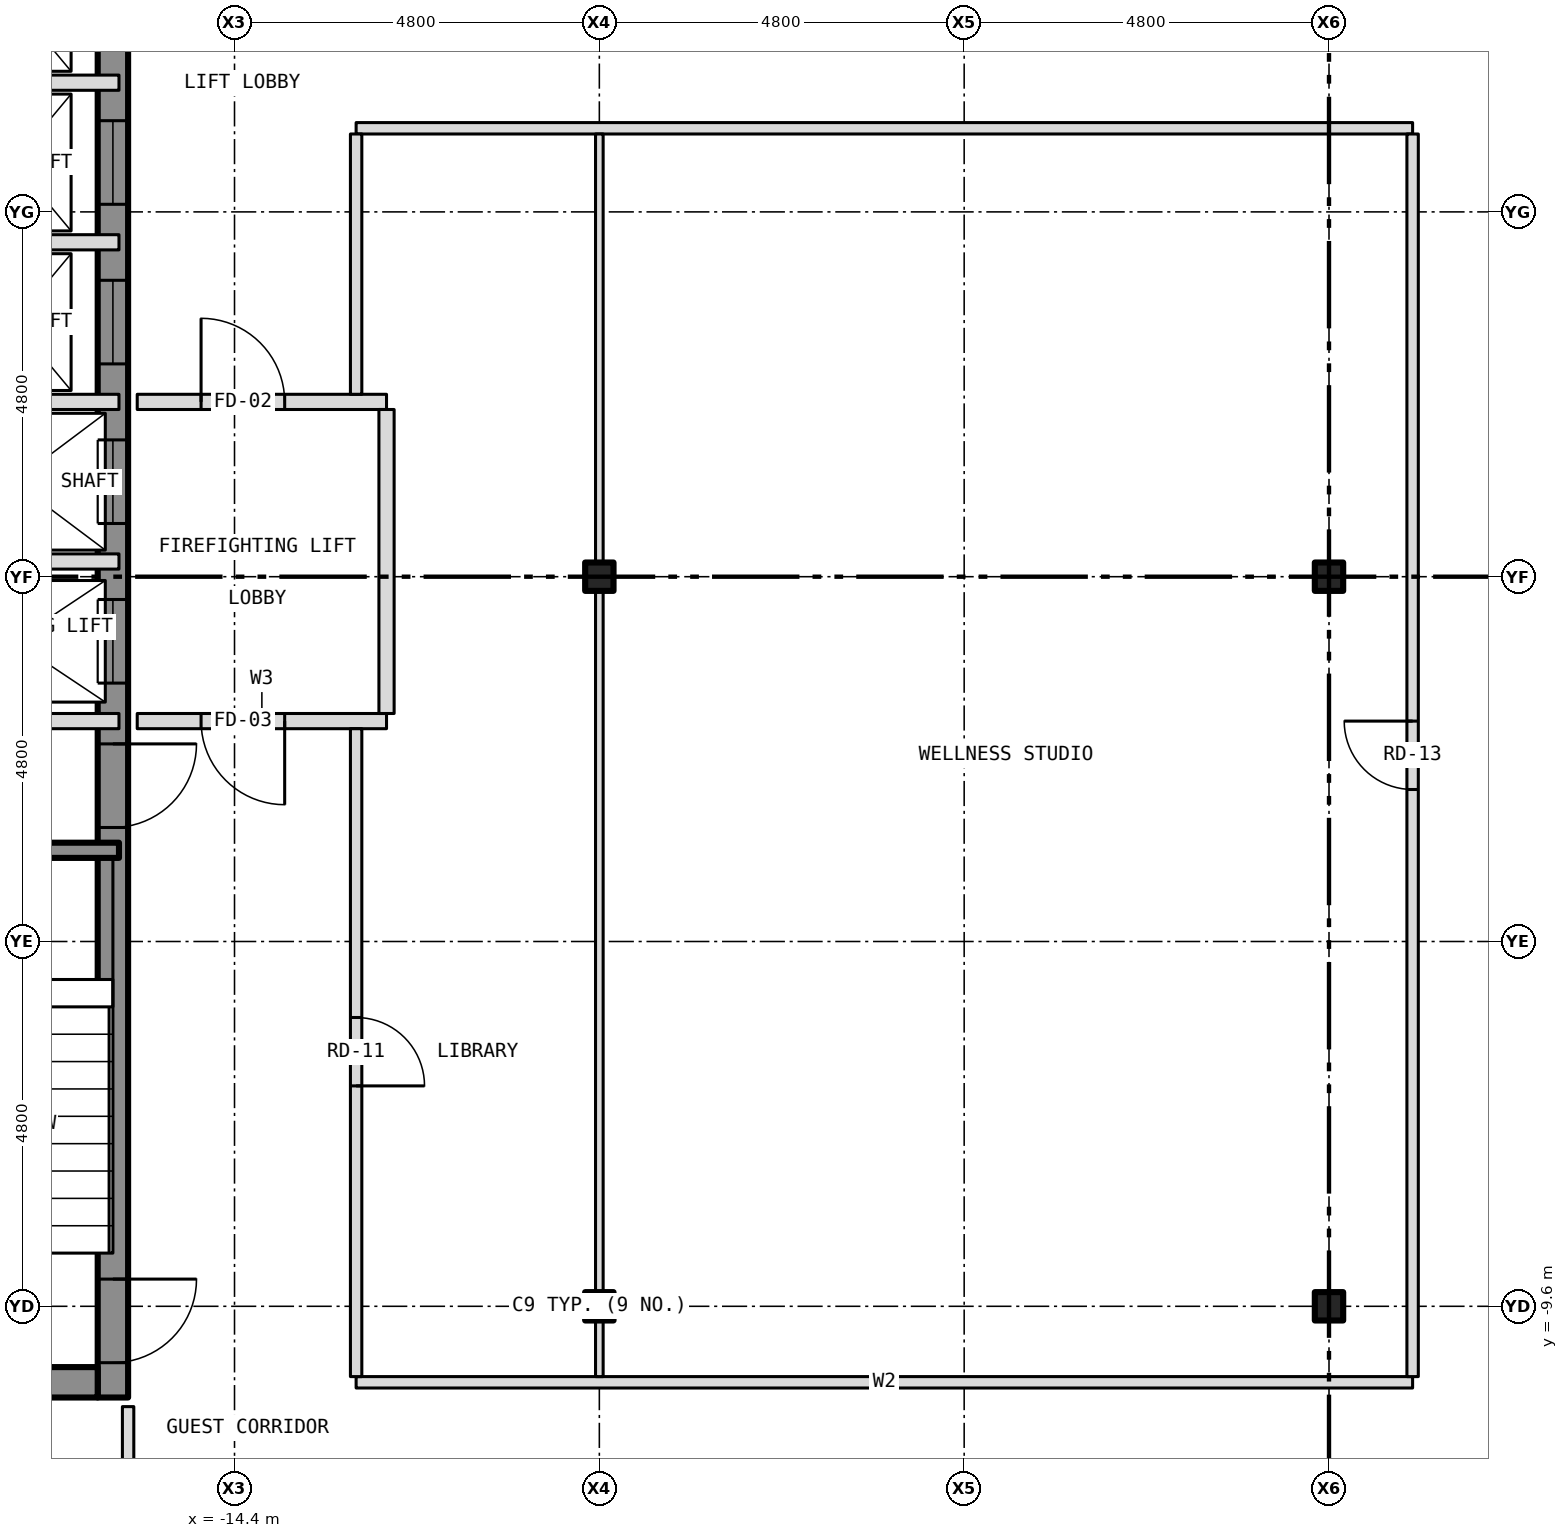
"""IFC4 building model, lengths in metres.
Left out: names, types, materials, properties, quantities, classifications, styles, units other than length and angle.
Written with IfcOpenShell. Run it as: python <this file> out.ifc"""

import sys

from ifc_helpers import new_model, si_unit, direction, frame, frame_2d, origin, origin_2d, place, context, subcontext, project, spatial, rectangle, i_section, extrude, element, fill, save


model = new_model("IFC4")
c1 = context("Model", 3, precision=1e-05, world=origin(), true_north=direction((0.0, 1.0)))
c2 = subcontext(c1, "Body", "Model", "MODEL_VIEW")
j1 = project(units=[si_unit("LENGTHUNIT", "METRE"), si_unit("PLANEANGLEUNIT", "RADIAN")], contexts=[c1])
p1 = place(None, origin())
s1 = spatial("IfcSite", under=j1, at=p1, CompositionType="ELEMENT")
p2 = place(p1, origin())
s2 = spatial("IfcBuilding", under=s1, at=p2, CompositionType="ELEMENT")
p3 = place(p2, frame((0.0, 0.0, 208.5)))
s3 = spatial("IfcBuildingStorey", under=s2, at=p3, CompositionType="ELEMENT", Elevation=208.5)
for number, where, z_axis, x_axis in (
    (1, (-9.6, -9.6, -0.15), (0.0, 0.0, 1.0), (1.0, 0.0, 0.0)),
    (2, (-9.6, 0.0, -0.15), (0.0, 0.0, 1.0), (1.0, 0.0, 0.0)),
    (3, (0.0, -9.6, -0.15), (0.0, 0.0, 1.0), (1.0, 0.0, 0.0)),
    (4, (0.0, 0.0, -0.15), (0.0, 0.0, 1.0), (1.0, 0.0, 0.0)),
):
    element("IfcColumn", number, at=place(p3, frame(where, z_axis=z_axis, x_axis=x_axis)), inside=s3, PredefinedType="COLUMN", context=c2, shape_type="SweptSolid", body=[
        extrude(i_section(OverallWidth=0.373, OverallDepth=0.373, WebThickness=0.016, FlangeThickness=0.026, at=origin_2d()), origin(), (0.0, 0.0, 1.0), 3.5),
    ])
p4 = place(p3, frame((-16.0, -10.8, 0.0), z_axis=(0.0, 0.0, 1.0), x_axis=(0.0, 1.0, 0.0)))
e5 = element("IfcWall", 5, at=p4, inside=s3, PredefinedType="SHEAR", context=c2, shape_type="SweptSolid", body=[
    extrude(rectangle(XDim=21.6, YDim=0.4, at=frame_2d((10.8, 0.0))), origin(), (0.0, 0.0, 1.0), 3.25),
])
p5 = place(p4, frame((9.4, 0.0, 0.0)))
e6 = element("IfcOpeningElement", 6, at=p5, cuts=e5, PredefinedType="OPENING", context=c2, shape_type="SweptSolid", body=[
    extrude(rectangle(XDim=1.1, YDim=2.1, at=frame_2d((0.55, 1.05))), frame((0.0, 0.212, 0.0), z_axis=(0.0, -1.0, 0.0), x_axis=(1.0, 0.0, 0.0)), (0.0, 0.0, 1.0), 0.424),
])
p6 = place(p4, frame((11.5, 0.0, 0.0)))
e7 = element("IfcOpeningElement", 7, at=p6, cuts=e5, PredefinedType="OPENING", context=c2, shape_type="SweptSolid", body=[
    extrude(rectangle(XDim=1.1, YDim=2.1, at=frame_2d((0.55, 1.05))), frame((0.0, 0.212, 0.0), z_axis=(0.0, -1.0, 0.0), x_axis=(1.0, 0.0, 0.0)), (0.0, 0.0, 1.0), 0.424),
])
p7 = place(p4, frame((13.6, 0.0, 0.0)))
e8 = element("IfcOpeningElement", 8, at=p7, cuts=e5, PredefinedType="OPENING", context=c2, shape_type="SweptSolid", body=[
    extrude(rectangle(XDim=1.1, YDim=2.1, at=frame_2d((0.55, 1.05))), frame((0.0, 0.212, 0.0), z_axis=(0.0, -1.0, 0.0), x_axis=(1.0, 0.0, 0.0)), (0.0, 0.0, 1.0), 0.424),
])
p8 = place(p4, frame((15.7, 0.0, 0.0)))
e9 = element("IfcOpeningElement", 9, at=p8, cuts=e5, PredefinedType="OPENING", context=c2, shape_type="SweptSolid", body=[
    extrude(rectangle(XDim=1.1, YDim=2.1, at=frame_2d((0.55, 1.05))), frame((0.0, 0.212, 0.0), z_axis=(0.0, -1.0, 0.0), x_axis=(1.0, 0.0, 0.0)), (0.0, 0.0, 1.0), 0.424),
])
p9 = place(p4, frame((17.8, 0.0, 0.0)))
e10 = element("IfcOpeningElement", 10, at=p9, cuts=e5, PredefinedType="OPENING", context=c2, shape_type="SweptSolid", body=[
    extrude(rectangle(XDim=1.1, YDim=2.1, at=frame_2d((0.55, 1.05))), frame((0.0, 0.212, 0.0), z_axis=(0.0, -1.0, 0.0), x_axis=(1.0, 0.0, 0.0)), (0.0, 0.0, 1.0), 0.424),
])
p10 = place(p4, frame((0.458, 0.0, 0.0)))
e11 = element("IfcOpeningElement", 11, at=p10, cuts=e5, PredefinedType="OPENING", context=c2, shape_type="SweptSolid", body=[
    extrude(rectangle(XDim=1.1, YDim=2.1, at=frame_2d((0.55, 1.05))), frame((0.0, 0.212, 0.0), z_axis=(0.0, -1.0, 0.0), x_axis=(1.0, 0.0, 0.0)), (0.0, 0.0, 1.0), 0.424),
])
p11 = place(p4, frame((7.5, 0.0, 0.0)))
e12 = element("IfcOpeningElement", 12, at=p11, cuts=e5, PredefinedType="OPENING", context=c2, shape_type="SweptSolid", body=[
    extrude(rectangle(XDim=1.1, YDim=2.1, at=frame_2d((0.55, 1.05))), frame((0.0, 0.212, 0.0), z_axis=(0.0, -1.0, 0.0), x_axis=(1.0, 0.0, 0.0)), (0.0, 0.0, 1.0), 0.424),
])
p12 = place(p4, frame((20.0, 0.0, 0.0)))
e13 = element("IfcOpeningElement", 13, at=p12, cuts=e5, PredefinedType="OPENING", context=c2, shape_type="SweptSolid", body=[
    extrude(rectangle(XDim=0.9, YDim=2.1, at=frame_2d((0.45, 1.05))), frame((0.0, 0.212, 0.0), z_axis=(0.0, -1.0, 0.0), x_axis=(1.0, 0.0, 0.0)), (0.0, 0.0, 1.0), 0.424),
])
p13 = place(p3, frame((-20.0, -10.6, 0.0), z_axis=(0.0, 0.0, 1.0), x_axis=(1.0, 0.0, 0.0)))
e14 = element("IfcWall", 14, at=p13, inside=s3, PredefinedType="SHEAR", context=c2, shape_type="SweptSolid", body=[
    extrude(rectangle(XDim=3.8, YDim=0.4, at=frame_2d((1.9, 0.0))), origin(), (0.0, 0.0, 1.0), 3.25),
])
p14 = place(p3, frame((-12.8, -10.6, 0.0), z_axis=(0.0, 0.0, 1.0), x_axis=(1.0, 0.0, 0.0)))
e15 = element("IfcWall", 15, at=p14, inside=s3, PredefinedType="PARTITIONING", context=c2, shape_type="SweptSolid", body=[
    extrude(rectangle(XDim=13.9, YDim=0.15, at=frame_2d((6.95, 0.0))), origin(), (0.0, 0.0, 1.0), 3.35),
])
p15 = place(p3, frame((-20.28, -3.6, 0.0), z_axis=(0.0, 0.0, 1.0), x_axis=(1.0, 0.0, 0.0)))
e16 = element("IfcWall", 16, at=p15, inside=s3, PredefinedType="SHEAR", context=c2, shape_type="SweptSolid", body=[
    extrude(rectangle(XDim=4.36, YDim=0.2, at=frame_2d((2.18, 0.0))), origin(), (0.0, 0.0, 1.0), 3.25),
])
p16 = place(p3, frame((-20.28, -1.9, 0.0), z_axis=(0.0, 0.0, 1.0), x_axis=(1.0, 0.0, 0.0)))
e17 = element("IfcWall", 17, at=p16, inside=s3, PredefinedType="PARTITIONING", context=c2, shape_type="SweptSolid", body=[
    extrude(rectangle(XDim=4.36, YDim=0.2, at=frame_2d((2.18, 0.0))), origin(), (0.0, 0.0, 1.0), 3.25),
])
p17 = place(p16, frame((0.28, 0.0, 0.0)))
e18 = element("IfcOpeningElement", 18, at=p17, cuts=e17, PredefinedType="OPENING", context=c2, shape_type="SweptSolid", body=[
    extrude(rectangle(XDim=0.9, YDim=2.1, at=frame_2d((0.45, 1.05))), frame((0.0, 0.112, 0.0), z_axis=(0.0, -1.0, 0.0), x_axis=(1.0, 0.0, 0.0)), (0.0, 0.0, 1.0), 0.224),
])
p18 = place(p3, frame((-15.68, -1.9, 0.0), z_axis=(0.0, 0.0, 1.0), x_axis=(1.0, 0.0, 0.0)))
e19 = element("IfcWall", 19, at=p18, inside=s3, PredefinedType="PARTITIONING", context=c2, shape_type="SweptSolid", body=[
    extrude(rectangle(XDim=3.28, YDim=0.2, at=frame_2d((1.64, 0.0))), origin(), (0.0, 0.0, 1.0), 3.35),
])
p19 = place(p18, frame((0.84, 0.0, 0.0)))
e20 = element("IfcOpeningElement", 20, at=p19, cuts=e19, PredefinedType="OPENING", context=c2, shape_type="SweptSolid", body=[
    extrude(rectangle(XDim=1.1, YDim=2.1, at=frame_2d((0.55, 1.05))), frame((0.0, 0.112, 0.0), z_axis=(0.0, -1.0, 0.0), x_axis=(1.0, 0.0, 0.0)), (0.0, 0.0, 1.0), 0.224),
])
for number, where, z_axis, x_axis in (
    (21, (-18.8, 0.2, 0.0), (0.0, 0.0, 1.0), (1.0, 0.0, 0.0)),
    (22, (-18.8, 2.3, 0.0), (0.0, 0.0, 1.0), (1.0, 0.0, 0.0)),
):
    element("IfcWall", number, at=place(p3, frame(where, z_axis=z_axis, x_axis=x_axis)), inside=s3, PredefinedType="PARTITIONING", context=c2, shape_type="SweptSolid", body=[
        extrude(rectangle(XDim=2.88, YDim=0.2, at=frame_2d((1.44, 0.0))), origin(), (0.0, 0.0, 1.0), 3.25),
    ])
p20 = place(p3, frame((-15.68, 2.3, 0.0), z_axis=(0.0, 0.0, 1.0), x_axis=(1.0, 0.0, 0.0)))
e23 = element("IfcWall", 23, at=p20, inside=s3, PredefinedType="PARTITIONING", context=c2, shape_type="SweptSolid", body=[
    extrude(rectangle(XDim=3.28, YDim=0.2, at=frame_2d((1.64, 0.0))), origin(), (0.0, 0.0, 1.0), 3.35),
])
p21 = place(p20, frame((0.84, 0.0, 0.0)))
e24 = element("IfcOpeningElement", 24, at=p21, cuts=e23, PredefinedType="OPENING", context=c2, shape_type="SweptSolid", body=[
    extrude(rectangle(XDim=1.1, YDim=2.1, at=frame_2d((0.55, 1.05))), frame((0.0, 0.112, 0.0), z_axis=(0.0, -1.0, 0.0), x_axis=(1.0, 0.0, 0.0)), (0.0, 0.0, 1.0), 0.224),
])
p22 = place(p3, frame((-18.8, 4.4, 0.0), z_axis=(0.0, 0.0, 1.0), x_axis=(1.0, 0.0, 0.0)))
e25 = element("IfcWall", 25, at=p22, inside=s3, PredefinedType="PARTITIONING", context=c2, shape_type="SweptSolid", body=[
    extrude(rectangle(XDim=2.88, YDim=0.2, at=frame_2d((1.44, 0.0))), origin(), (0.0, 0.0, 1.0), 3.25),
])
p23 = place(p3, frame((-12.8, 5.9, 0.0), z_axis=(0.0, 0.0, 1.0), x_axis=(1.0, 0.0, 0.0)))
e26 = element("IfcWall", 26, at=p23, inside=s3, PredefinedType="PARTITIONING", context=c2, shape_type="SweptSolid", body=[
    extrude(rectangle(XDim=13.9, YDim=0.15, at=frame_2d((6.95, 0.0))), origin(), (0.0, 0.0, 1.0), 3.35),
])
p24 = place(p3, frame((-18.8, 6.5, 0.0), z_axis=(0.0, 0.0, 1.0), x_axis=(1.0, 0.0, 0.0)))
e27 = element("IfcWall", 27, at=p24, inside=s3, PredefinedType="PARTITIONING", context=c2, shape_type="SweptSolid", body=[
    extrude(rectangle(XDim=2.88, YDim=0.2, at=frame_2d((1.44, 0.0))), origin(), (0.0, 0.0, 1.0), 3.25),
])
p25 = place(p3, frame((-15.8, -12.725, 0.0), z_axis=(0.0, 0.0, 1.0), x_axis=(0.0, 1.0, 0.0)))
e28 = element("IfcWall", 28, at=p25, inside=s3, PredefinedType="PARTITIONING", context=c2, shape_type="SweptSolid", body=[
    extrude(rectangle(XDim=1.805, YDim=0.15, at=frame_2d((0.903, 0.0))), origin(), (0.0, 0.0, 1.0), 3.35),
])
p26 = place(p3, frame((-12.8, -10.525, 0.0), z_axis=(0.0, 0.0, 1.0), x_axis=(0.0, 1.0, 0.0)))
e29 = element("IfcWall", 29, at=p26, inside=s3, PredefinedType="PARTITIONING", context=c2, shape_type="SweptSolid", body=[
    extrude(rectangle(XDim=8.525, YDim=0.15, at=frame_2d((4.262, 0.0))), origin(), (0.0, 0.0, 1.0), 3.35),
])
p27 = place(p26, frame((3.825, 0.0, 0.0)))
e30 = element("IfcOpeningElement", 30, at=p27, cuts=e29, PredefinedType="OPENING", context=c2, shape_type="SweptSolid", body=[
    extrude(rectangle(XDim=0.9, YDim=2.1, at=frame_2d((0.45, 1.05))), frame((0.0, 0.087, 0.0), z_axis=(0.0, -1.0, 0.0), x_axis=(1.0, 0.0, 0.0)), (0.0, 0.0, 1.0), 0.174),
])
p28 = place(p3, frame((-12.8, 2.4, 0.0), z_axis=(0.0, 0.0, 1.0), x_axis=(0.0, 1.0, 0.0)))
e31 = element("IfcWall", 31, at=p28, inside=s3, PredefinedType="PARTITIONING", context=c2, shape_type="SweptSolid", body=[
    extrude(rectangle(XDim=3.425, YDim=0.15, at=frame_2d((1.712, 0.0))), origin(), (0.0, 0.0, 1.0), 3.35),
])
p29 = place(p3, frame((-12.4, -1.8, 0.0), z_axis=(0.0, 0.0, 1.0), x_axis=(0.0, 1.0, 0.0)))
e32 = element("IfcWall", 32, at=p29, inside=s3, PredefinedType="PARTITIONING", context=c2, shape_type="SweptSolid", body=[
    extrude(rectangle(XDim=4.0, YDim=0.2, at=frame_2d((2.0, 0.0))), origin(), (0.0, 0.0, 1.0), 3.35),
])
p30 = place(p3, frame((-9.6, -10.525, 0.0), z_axis=(0.0, 0.0, 1.0), x_axis=(0.0, 1.0, 0.0)))
e33 = element("IfcWall", 33, at=p30, inside=s3, PredefinedType="PARTITIONING", context=c2, shape_type="SweptSolid", body=[
    extrude(rectangle(XDim=0.738, YDim=0.1, at=frame_2d((0.369, 0.0))), origin(), (0.0, 0.0, 1.0), 2.728),
])
p31 = place(p3, frame((-9.6, -9.787, 0.0), z_axis=(0.0, 0.0, 1.0), x_axis=(0.0, 1.0, 0.0)))
e34 = element("IfcWall", 34, at=p31, inside=s3, PredefinedType="PARTITIONING", context=c2, shape_type="SweptSolid", body=[
    extrude(rectangle(XDim=0.374, YDim=0.1, at=frame_2d((0.187, 0.0))), origin(), (0.0, 0.0, 1.0), 3.35),
])
p32 = place(p3, frame((-9.6, -9.413, 0.0), z_axis=(0.0, 0.0, 1.0), x_axis=(0.0, 1.0, 0.0)))
e35 = element("IfcWall", 35, at=p32, inside=s3, PredefinedType="PARTITIONING", context=c2, shape_type="SweptSolid", body=[
    extrude(rectangle(XDim=9.226, YDim=0.1, at=frame_2d((4.613, 0.0))), origin(), (0.0, 0.0, 1.0), 2.728),
])
p33 = place(p3, frame((-9.6, -0.187, 0.0), z_axis=(0.0, 0.0, 1.0), x_axis=(0.0, 1.0, 0.0)))
e36 = element("IfcWall", 36, at=p33, inside=s3, PredefinedType="PARTITIONING", context=c2, shape_type="SweptSolid", body=[
    extrude(rectangle(XDim=0.374, YDim=0.1, at=frame_2d((0.187, 0.0))), origin(), (0.0, 0.0, 1.0), 3.35),
])
p34 = place(p3, frame((-9.6, 0.187, 0.0), z_axis=(0.0, 0.0, 1.0), x_axis=(0.0, 1.0, 0.0)))
e37 = element("IfcWall", 37, at=p34, inside=s3, PredefinedType="PARTITIONING", context=c2, shape_type="SweptSolid", body=[
    extrude(rectangle(XDim=5.638, YDim=0.1, at=frame_2d((2.819, 0.0))), origin(), (0.0, 0.0, 1.0), 2.728),
])
p35 = place(p3, frame((1.1, -10.525, 0.0), z_axis=(0.0, 0.0, 1.0), x_axis=(0.0, 1.0, 0.0)))
e38 = element("IfcWall", 38, at=p35, inside=s3, PredefinedType="PARTITIONING", context=c2, shape_type="SweptSolid", body=[
    extrude(rectangle(XDim=16.35, YDim=0.15, at=frame_2d((8.175, 0.0))), origin(), (0.0, 0.0, 1.0), 3.35),
])
p36 = place(p35, frame((7.725, 0.0, 0.0)))
e39 = element("IfcOpeningElement", 39, at=p36, cuts=e38, PredefinedType="OPENING", context=c2, shape_type="SweptSolid", body=[
    extrude(rectangle(XDim=0.9, YDim=2.1, at=frame_2d((0.45, 1.05))), frame((0.0, 0.087, 0.0), z_axis=(0.0, -1.0, 0.0), x_axis=(1.0, 0.0, 0.0)), (0.0, 0.0, 1.0), 0.174),
])
p37 = place(p5, origin())
e40 = element("IfcDoor", 40, at=p37, inside=s3, OperationType="SLIDING_TO_LEFT", PredefinedType="DOOR", context=c2, shape_type="SweptSolid", body=[
    extrude(rectangle(XDim=1.1, YDim=2.1, at=frame_2d((0.55, 1.05))), frame((0.0, 0.025, 0.0), z_axis=(0.0, -1.0, 0.0), x_axis=(1.0, 0.0, 0.0)), (0.0, 0.0, 1.0), 0.05),
])
fill(e6, e40)
p38 = place(p6, origin())
e41 = element("IfcDoor", 41, at=p38, inside=s3, OperationType="SLIDING_TO_LEFT", PredefinedType="DOOR", context=c2, shape_type="SweptSolid", body=[
    extrude(rectangle(XDim=1.1, YDim=2.1, at=frame_2d((0.55, 1.05))), frame((0.0, 0.025, 0.0), z_axis=(0.0, -1.0, 0.0), x_axis=(1.0, 0.0, 0.0)), (0.0, 0.0, 1.0), 0.05),
])
fill(e7, e41)
p39 = place(p7, origin())
e42 = element("IfcDoor", 42, at=p39, inside=s3, OperationType="SLIDING_TO_LEFT", PredefinedType="DOOR", context=c2, shape_type="SweptSolid", body=[
    extrude(rectangle(XDim=1.1, YDim=2.1, at=frame_2d((0.55, 1.05))), frame((0.0, 0.025, 0.0), z_axis=(0.0, -1.0, 0.0), x_axis=(1.0, 0.0, 0.0)), (0.0, 0.0, 1.0), 0.05),
])
fill(e8, e42)
p40 = place(p8, origin())
e43 = element("IfcDoor", 43, at=p40, inside=s3, OperationType="SLIDING_TO_LEFT", PredefinedType="DOOR", context=c2, shape_type="SweptSolid", body=[
    extrude(rectangle(XDim=1.1, YDim=2.1, at=frame_2d((0.55, 1.05))), frame((0.0, 0.025, 0.0), z_axis=(0.0, -1.0, 0.0), x_axis=(1.0, 0.0, 0.0)), (0.0, 0.0, 1.0), 0.05),
])
fill(e9, e43)
p41 = place(p10, origin())
e44 = element("IfcDoor", 44, at=p41, inside=s3, OperationType="SINGLE_SWING_RIGHT", PredefinedType="DOOR", context=c2, shape_type="SweptSolid", body=[
    extrude(rectangle(XDim=1.1, YDim=2.1, at=frame_2d((0.55, 1.05))), frame((0.0, 0.025, 0.0), z_axis=(0.0, -1.0, 0.0), x_axis=(1.0, 0.0, 0.0)), (0.0, 0.0, 1.0), 0.05),
])
fill(e11, e44)
p42 = place(p11, origin())
e45 = element("IfcDoor", 45, at=p42, inside=s3, OperationType="SINGLE_SWING_RIGHT", PredefinedType="DOOR", context=c2, shape_type="SweptSolid", body=[
    extrude(rectangle(XDim=1.1, YDim=2.1, at=frame_2d((0.55, 1.05))), frame((0.0, 0.025, 0.0), z_axis=(0.0, -1.0, 0.0), x_axis=(1.0, 0.0, 0.0)), (0.0, 0.0, 1.0), 0.05),
])
fill(e12, e45)
p43 = place(p21, origin())
e46 = element("IfcDoor", 46, at=p43, inside=s3, OperationType="SINGLE_SWING_LEFT", PredefinedType="DOOR", context=c2, shape_type="SweptSolid", body=[
    extrude(rectangle(XDim=1.1, YDim=2.1, at=frame_2d((0.55, 1.05))), frame((0.0, 0.025, 0.0), z_axis=(0.0, -1.0, 0.0), x_axis=(1.0, 0.0, 0.0)), (0.0, 0.0, 1.0), 0.05),
])
fill(e24, e46)
p44 = place(p19, origin())
e47 = element("IfcDoor", 47, at=p44, inside=s3, OperationType="SINGLE_SWING_RIGHT", PredefinedType="DOOR", context=c2, shape_type="SweptSolid", body=[
    extrude(rectangle(XDim=1.1, YDim=2.1, at=frame_2d((0.55, 1.05))), frame((0.0, 0.025, 0.0), z_axis=(0.0, -1.0, 0.0), x_axis=(1.0, 0.0, 0.0)), (0.0, 0.0, 1.0), 0.05),
])
fill(e20, e47)
p45 = place(p27, origin())
e48 = element("IfcDoor", 48, at=p45, inside=s3, OperationType="SINGLE_SWING_LEFT", PredefinedType="DOOR", context=c2, shape_type="SweptSolid", body=[
    extrude(rectangle(XDim=0.9, YDim=2.1, at=frame_2d((0.45, 1.05))), frame((0.0, 0.025, 0.0), z_axis=(0.0, -1.0, 0.0), x_axis=(1.0, 0.0, 0.0)), (0.0, 0.0, 1.0), 0.05),
])
fill(e30, e48)
p46 = place(p36, origin())
e49 = element("IfcDoor", 49, at=p46, inside=s3, OperationType="SINGLE_SWING_RIGHT", PredefinedType="DOOR", context=c2, shape_type="SweptSolid", body=[
    extrude(rectangle(XDim=0.9, YDim=2.1, at=frame_2d((0.45, 1.05))), frame((0.0, 0.025, 0.0), z_axis=(0.0, -1.0, 0.0), x_axis=(1.0, 0.0, 0.0)), (0.0, 0.0, 1.0), 0.05),
])
fill(e39, e49)
save(model, sys.argv[1])
